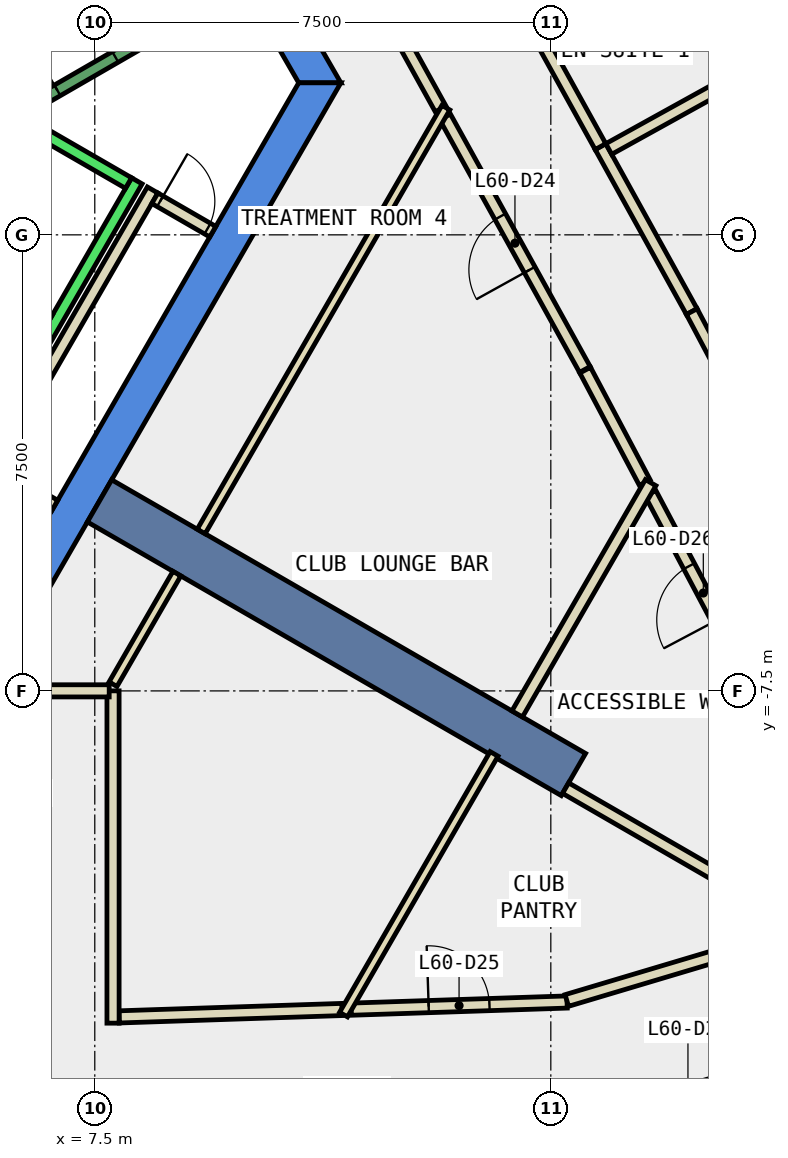
"""IFC4 building model, lengths in metres.
Left out: names, types, materials, properties, quantities, classifications, styles, units other than length and angle.
Written with IfcOpenShell. Run it as: python <this file> out.ifc"""

import sys

from ifc_helpers import new_model, si_unit, direction, frame, frame_2d, origin, place, context, subcontext, project, spatial, polyline, rectangle, outline, extrude, element, fill, save


model = new_model("IFC4")
c1 = context("Model", 3, precision=1e-05, world=origin(), true_north=direction((0.0, 1.0)))
c2 = subcontext(c1, "Body", "Model", "MODEL_VIEW")
j1 = project(units=[si_unit("LENGTHUNIT", "METRE"), si_unit("PLANEANGLEUNIT", "RADIAN")], contexts=[c1])
p1 = place(None, origin())
s1 = spatial("IfcSite", under=j1, at=p1, CompositionType="ELEMENT")
p2 = place(p1, origin())
s2 = spatial("IfcBuilding", under=s1, at=p2, CompositionType="ELEMENT")
p3 = place(p2, frame((0.0, 0.0, 263.0)))
s3 = spatial("IfcBuildingStorey", under=s2, at=p3, CompositionType="ELEMENT", Elevation=263.0)
p4 = place(p3, frame((0.0, 0.0, -0.34)))
e1 = element("IfcWall", 1, at=p4, inside=s3, PredefinedType="SHEAR", context=c2, shape_type="SweptSolid", body=[
    extrude(outline(polyline([(6.786, 10.747), (6.266, 10.447), (10.854, 2.5), (11.547, 2.5), (6.786, 10.747)])), origin(), (0.0, 0.0, 1.0), 3.6),
])
p5 = place(p3, frame((0.0, 0.0, -0.34)))
e2 = element("IfcWall", 2, at=p5, inside=s3, PredefinedType="SHEAR", context=c2, shape_type="SweptSolid", body=[
    extrude(outline(polyline([(5.774, -7.5), (11.547, 2.5), (10.854, 2.5), (5.427, -6.9), (5.774, -7.5)])), origin(), (0.0, 0.0, 1.0), 3.6),
])
p6 = place(p3, frame((7.578, -4.375, -0.34), z_axis=(0.0, 0.0, 1.0), x_axis=(0.866024315419, -0.5000018851, 0.0)))
e3 = element("IfcWall", 3, at=p6, inside=s3, PredefinedType="SHEAR", context=c2, shape_type="SweptSolid", body=[
    extrude(rectangle(XDim=9.0, YDim=0.8, at=frame_2d((4.5, 0.0))), origin(), (0.0, 0.0, 1.0), 3.6),
])
p7 = place(p3, frame((13.188, 2.071, 0.0), z_axis=(0.0, 0.0, 1.0), x_axis=(-0.484398936474, 0.874847226859, 0.0)))
e4 = element("IfcWall", 4, at=p7, inside=s3, PredefinedType="PARTITIONING", context=c2, shape_type="SweptSolid", body=[
    extrude(rectangle(XDim=1.567, YDim=0.2, at=frame_2d((0.783, 0.0))), origin(), (0.0, 0.0, 1.0), 3.26),
])
p8 = place(p3, frame((7.9, -12.861, 0.0), z_axis=(0.0, 0.0, 1.0), x_axis=(0.999446088303, 0.033279371614, 0.0)))
e5 = element("IfcWall", 5, at=p8, inside=s3, PredefinedType="PARTITIONING", context=c2, shape_type="SweptSolid", body=[
    extrude(rectangle(XDim=3.668, YDim=0.2, at=frame_2d((1.834, 0.0))), origin(), (0.0, 0.0, 1.0), 3.26),
])
p9 = place(p3, frame((16.545, -4.074, 0.0), z_axis=(0.0, 0.0, 1.0), x_axis=(-0.468321873419, 0.883557934081, 0.0)))
e6 = element("IfcWall", 6, at=p9, inside=s3, PredefinedType="PARTITIONING", context=c2, shape_type="SweptSolid", body=[
    extrude(rectangle(XDim=2.093, YDim=0.2, at=frame_2d((1.046, 0.0))), origin(), (0.0, 0.0, 1.0), 3.26),
])
p10 = place(p3, frame((15.56, -2.214, 0.0), z_axis=(0.0, 0.0, 1.0), x_axis=(-0.484323615817, 0.874888927329, 0.0)))
e7 = element("IfcWall", 7, at=p10, inside=s3, PredefinedType="PARTITIONING", context=c2, shape_type="SweptSolid", body=[
    extrude(rectangle(XDim=4.747, YDim=0.2, at=frame_2d((2.374, 0.0))), origin(), (0.0, 0.0, 1.0), 3.26),
])
p11 = place(p10, frame((1.874, 0.0, 0.0)))
e8 = element("IfcOpeningElement", 8, at=p11, cuts=e7, PredefinedType="OPENING", context=c2, shape_type="SweptSolid", body=[
    extrude(rectangle(XDim=1.0, YDim=2.1, at=frame_2d((0.5, 1.05))), frame((0.0, 0.11, 0.0), z_axis=(0.0, -1.0, 0.0), x_axis=(1.0, 0.0, 0.0)), (0.0, 0.0, 1.0), 0.22),
])
p12 = place(p3, frame((11.716, -12.734, 0.0), z_axis=(0.0, 0.0, 1.0), x_axis=(0.999449093602, 0.03318899362, 0.0)))
e9 = element("IfcWall", 9, at=p12, inside=s3, PredefinedType="PARTITIONING", context=c2, shape_type="SweptSolid", body=[
    extrude(rectangle(XDim=3.553, YDim=0.2, at=frame_2d((1.776, 0.0))), origin(), (0.0, 0.0, 1.0), 3.26),
])
p13 = place(p12, frame((1.276, 0.0, 0.0)))
e10 = element("IfcOpeningElement", 10, at=p13, cuts=e9, PredefinedType="OPENING", context=c2, shape_type="SweptSolid", body=[
    extrude(rectangle(XDim=1.0, YDim=2.1, at=frame_2d((0.5, 1.05))), frame((0.0, 0.11, 0.0), z_axis=(0.0, -1.0, 0.0), x_axis=(1.0, 0.0, 0.0)), (0.0, 0.0, 1.0), 0.22),
])
p14 = place(p3, frame((15.263, -12.591, 0.0), z_axis=(0.0, 0.0, 1.0), x_axis=(0.958253964342, 0.285918414628, 0.0)))
e11 = element("IfcWall", 11, at=p14, inside=s3, PredefinedType="PARTITIONING", context=c2, shape_type="SweptSolid", body=[
    extrude(rectangle(XDim=2.743, YDim=0.2, at=frame_2d((1.371, 0.0))), origin(), (0.0, 0.0, 1.0), 3.26),
])
p15 = place(p3, frame((18.377, -7.53, 0.0), z_axis=(0.0, 0.0, 1.0), x_axis=(-0.468214048123, 0.883615077474, 0.0)))
e12 = element("IfcWall", 12, at=p15, inside=s3, PredefinedType="PARTITIONING", context=c2, shape_type="SweptSolid", body=[
    extrude(rectangle(XDim=3.712, YDim=0.2, at=frame_2d((1.856, 0.0))), origin(), (0.0, 0.0, 1.0), 3.26),
])
p16 = place(p15, frame((1.356, 0.0, 0.0)))
e13 = element("IfcOpeningElement", 13, at=p16, cuts=e12, PredefinedType="OPENING", context=c2, shape_type="SweptSolid", body=[
    extrude(rectangle(XDim=1.0, YDim=2.1, at=frame_2d((0.5, 1.05))), frame((0.0, 0.11, 0.0), z_axis=(0.0, -1.0, 0.0), x_axis=(1.0, 0.0, 0.0)), (0.0, 0.0, 1.0), 0.22),
])
p17 = place(p3, frame((18.924, -13.587, 0.0), z_axis=(0.0, 0.0, 1.0), x_axis=(-0.958378336681, -0.285501250052, 0.0)))
e14 = element("IfcWall", 14, at=p17, inside=s3, PredefinedType="PARTITIONING", context=c2, shape_type="SweptSolid", body=[
    extrude(rectangle(XDim=3.482, YDim=0.2, at=frame_2d((1.741, 0.0))), origin(), (0.0, 0.0, 1.0), 3.26),
])
p18 = place(p17, frame((0.841, 0.0, 0.0)))
e15 = element("IfcOpeningElement", 15, at=p18, cuts=e14, PredefinedType="OPENING", context=c2, shape_type="SweptSolid", body=[
    extrude(rectangle(XDim=1.8, YDim=2.1, at=frame_2d((0.9, 1.05))), frame((0.0, 0.11, 0.0), z_axis=(0.0, -1.0, 0.0), x_axis=(1.0, 0.0, 0.0)), (0.0, 0.0, 1.0), 0.22),
])
p19 = place(p3, frame((15.817, 1.451, 0.0), z_axis=(0.0, 0.0, 1.0), x_axis=(0.48417811398, -0.874969458863, 0.0)))
e16 = element("IfcWall", 16, at=p19, inside=s3, PredefinedType="PARTITIONING", context=c2, shape_type="SweptSolid", body=[
    extrude(rectangle(XDim=3.101, YDim=0.2, at=frame_2d((1.55, 0.0))), origin(), (0.0, 0.0, 1.0), 3.26),
])
p20 = place(p3, frame((17.318, -1.262, 0.0), z_axis=(0.0, 0.0, 1.0), x_axis=(0.468313568794, -0.883562335822, 0.0)))
e17 = element("IfcWall", 17, at=p20, inside=s3, PredefinedType="PARTITIONING", context=c2, shape_type="SweptSolid", body=[
    extrude(rectangle(XDim=6.216, YDim=0.2, at=frame_2d((3.108, 0.0))), origin(), (0.0, 0.0, 1.0), 3.26),
])
p21 = place(p20, frame((2.608, 0.0, 0.0)))
e18 = element("IfcOpeningElement", 18, at=p21, cuts=e17, PredefinedType="OPENING", context=c2, shape_type="SweptSolid", body=[
    extrude(rectangle(XDim=1.0, YDim=2.1, at=frame_2d((0.5, 1.05))), frame((0.0, 0.11, 0.0), z_axis=(0.0, -1.0, 0.0), x_axis=(1.0, 0.0, 0.0)), (0.0, 0.0, 1.0), 0.22),
])
p22 = place(p3, frame((14.267, 4.25, 0.0), z_axis=(0.0, 0.0, 1.0), x_axis=(0.4843920198, -0.874851056554, 0.0)))
e19 = element("IfcWall", 19, at=p22, inside=s3, PredefinedType="PARTITIONING", context=c2, shape_type="SweptSolid", body=[
    extrude(rectangle(XDim=3.199, YDim=0.2, at=frame_2d((1.6, 0.0))), origin(), (0.0, 0.0, 1.0), 3.26),
])
p23 = place(p3, frame((5.751, -3.938, 0.0), z_axis=(0.0, 0.0, 1.0), x_axis=(0.500034260056, 0.866005622828, 0.0)))
e20 = element("IfcWall", 20, at=p23, inside=s3, PredefinedType="PARTITIONING", context=c2, shape_type="SweptSolid", body=[
    extrude(rectangle(XDim=5.399, YDim=0.2, at=frame_2d((2.7, 0.0))), origin(), (0.0, 0.0, 1.0), 3.26),
])
p24 = place(p3, frame((8.488, 0.602, 0.0), z_axis=(0.0, 0.0, 1.0), x_axis=(0.866063652425, -0.499933745558, 0.0)))
e21 = element("IfcWall", 21, at=p24, inside=s3, PredefinedType="PARTITIONING", context=c2, shape_type="SweptSolid", body=[
    extrude(rectangle(XDim=1.1, YDim=0.2, at=frame_2d((0.55, 0.0))), origin(), (0.0, 0.0, 1.0), 3.26),
])
p25 = place(p24, frame((0.1, 0.0, 0.0)))
e22 = element("IfcOpeningElement", 22, at=p25, cuts=e21, PredefinedType="OPENING", context=c2, shape_type="SweptSolid", body=[
    extrude(rectangle(XDim=0.9, YDim=2.1, at=frame_2d((0.45, 1.05))), frame((0.0, 0.11, 0.0), z_axis=(0.0, -1.0, 0.0), x_axis=(1.0, 0.0, 0.0)), (0.0, 0.0, 1.0), 0.22),
])
p26 = place(p3, frame((6.841, -4.452, 0.0), z_axis=(0.0, 0.0, 1.0), x_axis=(-0.86621513555, 0.499671230855, 0.0)))
e23 = element("IfcWall", 23, at=p26, inside=s3, PredefinedType="PARTITIONING", context=c2, shape_type="SweptSolid", body=[
    extrude(rectangle(XDim=1.1, YDim=0.2, at=frame_2d((0.55, 0.0))), origin(), (0.0, 0.0, 1.0), 3.26),
])
p27 = place(p3, frame((7.8, -7.39, 0.0), z_axis=(0.0, 0.0, 1.0), x_axis=(0.499977374825, 0.866038466041, 0.0)))
e24 = element("IfcWall", 24, at=p27, inside=s3, PredefinedType="PARTITIONING", context=c2, shape_type="SweptSolid", body=[
    extrude(rectangle(XDim=2.1, YDim=0.15, at=frame_2d((1.05, 0.0))), origin(), (0.0, 0.0, 1.0), 3.26),
])
p28 = place(p3, frame((7.8, -7.499, 0.0), z_axis=(0.0, 0.0, 1.0), x_axis=(0.0, -1.0, 0.0)))
e25 = element("IfcWall", 25, at=p28, inside=s3, PredefinedType="PARTITIONING", context=c2, shape_type="SweptSolid", body=[
    extrude(rectangle(XDim=5.465, YDim=0.2, at=frame_2d((2.732, 0.0))), origin(), (0.0, 0.0, 1.0), 3.26),
])
p29 = place(p3, frame((14.067, -8.536, 0.0), z_axis=(0.0, 0.0, 1.0), x_axis=(-0.500100941679, -0.865967117235, 0.0)))
e26 = element("IfcWall", 26, at=p29, inside=s3, PredefinedType="PARTITIONING", context=c2, shape_type="SweptSolid", body=[
    extrude(rectangle(XDim=4.951, YDim=0.15, at=frame_2d((2.475, 0.0))), origin(), (0.0, 0.0, 1.0), 3.26),
])
p30 = place(p3, frame((16.642, -4.075, 0.0), z_axis=(0.0, 0.0, 1.0), x_axis=(-0.49980426207, -0.866138383641, 0.0)))
e27 = element("IfcWall", 27, at=p30, inside=s3, PredefinedType="PARTITIONING", context=c2, shape_type="SweptSolid", body=[
    extrude(rectangle(XDim=4.392, YDim=0.2, at=frame_2d((2.196, 0.0))), origin(), (0.0, 0.0, 1.0), 3.26),
])
p31 = place(p3, frame((15.243, -9.099, 0.0), z_axis=(0.0, 0.0, 1.0), x_axis=(0.866026010844, -0.49999894854, 0.0)))
e28 = element("IfcWall", 28, at=p31, inside=s3, PredefinedType="PARTITIONING", context=c2, shape_type="SweptSolid", body=[
    extrude(rectangle(XDim=4.0, YDim=0.2, at=frame_2d((2.0, 0.0))), origin(), (0.0, 0.0, 1.0), 3.26),
])
p32 = place(p3, frame((15.953, 1.412, 0.0), z_axis=(0.0, 0.0, 1.0), x_axis=(0.875014790305, 0.484096185429, 0.0)))
e29 = element("IfcWall", 29, at=p32, inside=s3, PredefinedType="PARTITIONING", context=c2, shape_type="SweptSolid", body=[
    extrude(rectangle(XDim=2.4, YDim=0.2, at=frame_2d((1.2, 0.0))), origin(), (0.0, 0.0, 1.0), 3.26),
])
p33 = place(p3, frame((18.189, 2.535, 0.0), z_axis=(0.0, 0.0, 1.0), x_axis=(-0.484447408253, 0.874820386501, 0.0)))
e30 = element("IfcWall", 30, at=p33, inside=s3, PredefinedType="PARTITIONING", context=c2, shape_type="SweptSolid", body=[
    extrude(rectangle(XDim=3.4, YDim=0.2, at=frame_2d((1.7, 0.0))), origin(), (0.0, 0.0, 1.0), 3.26),
])
p34 = place(p33, frame((1.25, 0.0, 0.0)))
e31 = element("IfcOpeningElement", 31, at=p34, cuts=e30, PredefinedType="OPENING", context=c2, shape_type="SweptSolid", body=[
    extrude(rectangle(XDim=0.9, YDim=2.1, at=frame_2d((0.45, 1.05))), frame((0.0, 0.11, 0.0), z_axis=(0.0, -1.0, 0.0), x_axis=(1.0, 0.0, 0.0)), (0.0, 0.0, 1.0), 0.22),
])
p35 = place(p3, frame((9.25, -4.878, 0.0), z_axis=(0.0, 0.0, 1.0), x_axis=(0.499982416899, 0.866035555154, 0.0)))
e32 = element("IfcWall", 32, at=p35, inside=s3, PredefinedType="PARTITIONING", context=c2, shape_type="SweptSolid", body=[
    extrude(rectangle(XDim=8.048, YDim=0.15, at=frame_2d((4.024, 0.0))), origin(), (0.0, 0.0, 1.0), 3.26),
])
p36 = place(p3, frame((5.944, -7.499, 0.0), z_axis=(0.0, 0.0, 1.0), x_axis=(1.0, 0.0, 0.0)))
e33 = element("IfcWall", 33, at=p36, inside=s3, PredefinedType="PARTITIONING", context=c2, shape_type="SweptSolid", body=[
    extrude(rectangle(XDim=1.793, YDim=0.2, at=frame_2d((0.896, 0.0))), origin(), (0.0, 0.0, 1.0), 3.26),
])
p37 = place(p3, frame((5.492, -3.788, 0.0), z_axis=(0.0, 0.0, 1.0), x_axis=(0.500034260056, 0.866005622828, 0.0)))
e34 = element("IfcWall", 34, at=p37, inside=s3, PredefinedType="STANDARD", context=c2, shape_type="SweptSolid", body=[
    extrude(rectangle(XDim=5.399, YDim=0.2, at=frame_2d((2.7, 0.0))), origin(), (0.0, 0.0, 1.0), 3.26),
])
for number, where, z_axis, x_axis in (
    (35, (4.677, -0.2, 0.0), (0.0, 0.0, 1.0), (0.866, -0.5, 0.0)),
    (36, (5.977, 2.052, 0.0), (0.0, 0.0, 1.0), (0.866, -0.5, 0.0)),
):
    element("IfcWall", number, at=place(p3, frame(where, z_axis=z_axis, x_axis=x_axis)), inside=s3, PredefinedType="STANDARD", context=c2, shape_type="SweptSolid", body=[
        extrude(rectangle(XDim=2.399, YDim=0.2, at=frame_2d((1.2, 0.0))), origin(), (0.0, 0.0, 1.0), 3.26),
    ])
p38 = place(p3, frame((4.806, 1.176, 0.0), z_axis=(0.0, 0.0, 1.0), x_axis=(0.866059941101, 0.499940174841, 0.0)))
e37 = element("IfcWall", 37, at=p38, inside=s3, PredefinedType="STANDARD", context=c2, shape_type="SweptSolid", body=[
    extrude(rectangle(XDim=4.4, YDim=0.2, at=frame_2d((2.2, 0.0))), origin(), (0.0, 0.0, 1.0), 3.26),
])
p39 = place(p38, frame((2.4, 0.0, 0.0)))
e38 = element("IfcOpeningElement", 38, at=p39, cuts=e37, PredefinedType="OPENING", context=c2, shape_type="SweptSolid", body=[
    extrude(rectangle(XDim=1.1, YDim=2.2, at=frame_2d((0.55, 1.1))), frame((0.0, 0.11, 0.0), z_axis=(0.0, -1.0, 0.0), x_axis=(1.0, 0.0, 0.0)), (0.0, 0.0, 1.0), 0.22),
])
p40 = place(p18, origin())
e39 = element("IfcDoor", 39, at=p40, inside=s3, OperationType="DOUBLE_DOOR_SINGLE_SWING", PredefinedType="DOOR", context=c2, shape_type="SweptSolid", body=[
    extrude(rectangle(XDim=1.8, YDim=2.1, at=frame_2d((0.9, 1.05))), frame((0.0, 0.025, 0.0), z_axis=(0.0, -1.0, 0.0), x_axis=(1.0, 0.0, 0.0)), (0.0, 0.0, 1.0), 0.05),
])
fill(e15, e39)
p41 = place(p11, origin())
e40 = element("IfcDoor", 40, at=p41, inside=s3, OperationType="SINGLE_SWING_LEFT", PredefinedType="DOOR", context=c2, shape_type="SweptSolid", body=[
    extrude(rectangle(XDim=1.0, YDim=2.1, at=frame_2d((0.5, 1.05))), frame((0.0, 0.025, 0.0), z_axis=(0.0, -1.0, 0.0), x_axis=(1.0, 0.0, 0.0)), (0.0, 0.0, 1.0), 0.05),
])
fill(e8, e40)
p42 = place(p13, origin())
e41 = element("IfcDoor", 41, at=p42, inside=s3, OperationType="SINGLE_SWING_LEFT", PredefinedType="DOOR", context=c2, shape_type="SweptSolid", body=[
    extrude(rectangle(XDim=1.0, YDim=2.1, at=frame_2d((0.5, 1.05))), frame((0.0, 0.025, 0.0), z_axis=(0.0, -1.0, 0.0), x_axis=(1.0, 0.0, 0.0)), (0.0, 0.0, 1.0), 0.05),
])
fill(e10, e41)
p43 = place(p16, origin())
e42 = element("IfcDoor", 42, at=p43, inside=s3, OperationType="SINGLE_SWING_RIGHT", PredefinedType="DOOR", context=c2, shape_type="SweptSolid", body=[
    extrude(rectangle(XDim=1.0, YDim=2.1, at=frame_2d((0.5, 1.05))), frame((0.0, 0.025, 0.0), z_axis=(0.0, -1.0, 0.0), x_axis=(1.0, 0.0, 0.0)), (0.0, 0.0, 1.0), 0.05),
])
fill(e13, e42)
p44 = place(p25, origin())
e43 = element("IfcDoor", 43, at=p44, inside=s3, OperationType="SINGLE_SWING_RIGHT", PredefinedType="DOOR", context=c2, shape_type="SweptSolid", body=[
    extrude(rectangle(XDim=0.9, YDim=2.1, at=frame_2d((0.45, 1.05))), frame((0.0, 0.025, 0.0), z_axis=(0.0, -1.0, 0.0), x_axis=(1.0, 0.0, 0.0)), (0.0, 0.0, 1.0), 0.05),
])
fill(e22, e43)
p45 = place(p39, origin())
e44 = element("IfcDoor", 44, at=p45, inside=s3, OperationType="SINGLE_SWING_LEFT", PredefinedType="DOOR", context=c2, shape_type="SweptSolid", body=[
    extrude(rectangle(XDim=1.1, YDim=2.2, at=frame_2d((0.55, 1.1))), frame((0.0, 0.025, 0.0), z_axis=(0.0, -1.0, 0.0), x_axis=(1.0, 0.0, 0.0)), (0.0, 0.0, 1.0), 0.05),
])
fill(e38, e44)
save(model, sys.argv[1])
